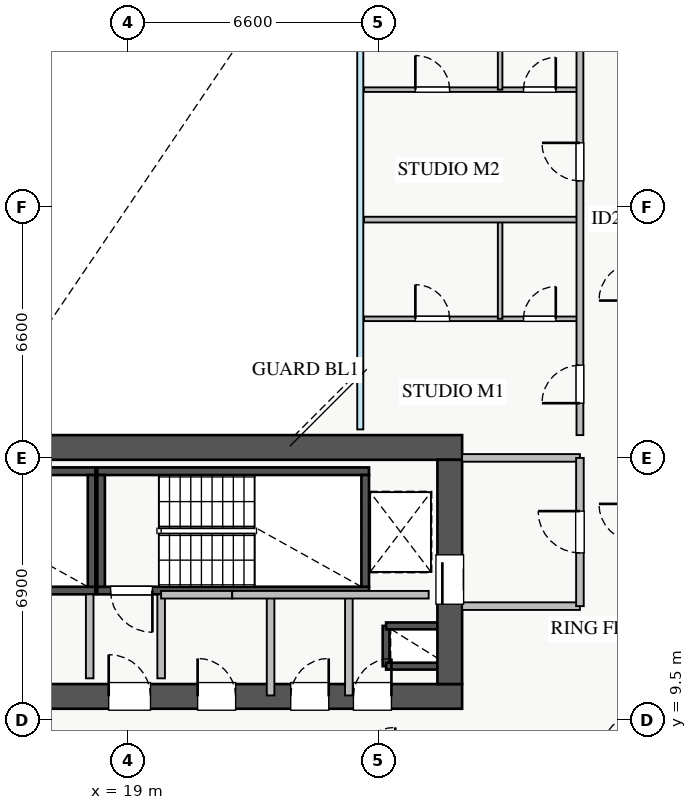
"""IFC4 building model, lengths in metres.
Left out: names, types, materials, properties, quantities, classifications, styles, units other than length and angle.
Written with IfcOpenShell. Run it as: python <this file> out.ifc"""

import sys

from ifc_helpers import new_model, si_unit, direction, frame, frame_2d, origin, place, context, subcontext, project, spatial, rectangle, extrude, source, transform, mapped, element, fill, save


model = new_model("IFC4")
c1 = context("Model", 3, precision=1e-05, world=origin(), true_north=direction((0.0, 1.0)))
c2 = subcontext(c1, "Body", "Model", "MODEL_VIEW")
j1 = project(units=[si_unit("LENGTHUNIT", "METRE"), si_unit("PLANEANGLEUNIT", "RADIAN")], contexts=[c1])
p1 = place(None, origin())
s1 = spatial("IfcSite", under=j1, at=p1, CompositionType="ELEMENT")
p2 = place(p1, origin())
s2 = spatial("IfcBuilding", under=s1, at=p2, CompositionType="ELEMENT")
p3 = place(p2, frame((0.0, 0.0, 100.25)))
s3 = spatial("IfcBuildingStorey", under=s2, at=p3, CompositionType="ELEMENT", Elevation=100.25)
p4 = place(p3, frame((25.8, 10.92, 0.0), z_axis=(0.0, 0.0, 1.0), x_axis=(0.0, 1.0, 0.0)))
e1 = element("IfcWall", 1, at=p4, inside=s3, PredefinedType="SHEAR", context=c2, shape_type="SweptSolid", body=[
    extrude(rectangle(XDim=1.06, YDim=0.18, at=frame_2d((0.53, 0.0))), origin(), (0.0, 0.0, 1.0), 3.07),
])
for number, where, z_axis, x_axis in (
    (2, (25.8, 11.98, 0.0), (0.0, 0.0, 1.0), (1.0, 0.0, 0.0)),
    (3, (25.8, 10.92, 0.0), (0.0, 0.0, 1.0), (1.0, 0.0, 0.0)),
):
    element("IfcWall", number, at=place(p3, frame(where, z_axis=z_axis, x_axis=x_axis)), inside=s3, PredefinedType="SHEAR", context=c2, shape_type="SweptSolid", body=[
        extrude(rectangle(XDim=1.35, YDim=0.18, at=frame_2d((0.675, 0.0))), origin(), (0.0, 0.0, 1.0), 3.07),
    ])
p5 = place(p3, frame((10.85, 12.91, 0.0), z_axis=(0.0, 0.0, 1.0), x_axis=(1.0, 0.0, 0.0)))
e4 = element("IfcWall", 4, at=p5, inside=s3, PredefinedType="SHEAR", context=c2, shape_type="SweptSolid", body=[
    extrude(rectangle(XDim=7.3, YDim=0.2, at=frame_2d((3.65, 0.0))), origin(), (0.0, 0.0, 1.0), 3.25),
])
p6 = place(p5, frame((0.35, 0.0, 0.0)))
e5 = element("IfcOpeningElement", 5, at=p6, cuts=e4, PredefinedType="OPENING", context=c2, shape_type="SweptSolid", body=[
    extrude(rectangle(XDim=1.1, YDim=2.05, at=frame_2d((0.55, 1.025))), frame((0.0, 0.11, 0.0), z_axis=(0.0, -1.0, 0.0), x_axis=(1.0, 0.0, 0.0)), (0.0, 0.0, 1.0), 0.22),
])
p7 = place(p3, frame((10.85, 16.05, 0.0), z_axis=(0.0, 0.0, 1.0), x_axis=(1.0, 0.0, 0.0)))
e6 = element("IfcWall", 6, at=p7, inside=s3, PredefinedType="SHEAR", context=c2, shape_type="SweptSolid", body=[
    extrude(rectangle(XDim=7.3, YDim=0.2, at=frame_2d((3.65, 0.0))), origin(), (0.0, 0.0, 1.0), 3.25),
])
p8 = place(p3, frame((18.05, 13.01, 0.0), z_axis=(0.0, 0.0, 1.0), x_axis=(0.0, 1.0, 0.0)))
e7 = element("IfcWall", 7, at=p8, inside=s3, PredefinedType="SHEAR", context=c2, shape_type="SweptSolid", body=[
    extrude(rectangle(XDim=2.94, YDim=0.2, at=frame_2d((1.47, 0.0))), origin(), (0.0, 0.0, 1.0), 3.25),
])
p9 = place(p3, frame((18.2, 12.91, 0.0), z_axis=(0.0, 0.0, 1.0), x_axis=(1.0, 0.0, 0.0)))
e8 = element("IfcWall", 8, at=p9, inside=s3, PredefinedType="SHEAR", context=c2, shape_type="SweptSolid", body=[
    extrude(rectangle(XDim=7.15, YDim=0.2, at=frame_2d((3.575, 0.0))), origin(), (0.0, 0.0, 1.0), 3.25),
])
p10 = place(p9, frame((0.35, 0.0, 0.0)))
e9 = element("IfcOpeningElement", 9, at=p10, cuts=e8, PredefinedType="OPENING", context=c2, shape_type="SweptSolid", body=[
    extrude(rectangle(XDim=1.1, YDim=2.05, at=frame_2d((0.55, 1.025))), frame((0.0, 0.11, 0.0), z_axis=(0.0, -1.0, 0.0), x_axis=(1.0, 0.0, 0.0)), (0.0, 0.0, 1.0), 0.22),
])
p11 = place(p3, frame((18.2, 16.05, 0.0), z_axis=(0.0, 0.0, 1.0), x_axis=(1.0, 0.0, 0.0)))
e10 = element("IfcWall", 10, at=p11, inside=s3, PredefinedType="SHEAR", context=c2, shape_type="SweptSolid", body=[
    extrude(rectangle(XDim=7.15, YDim=0.2, at=frame_2d((3.575, 0.0))), origin(), (0.0, 0.0, 1.0), 3.25),
])
for number, where, z_axis, x_axis in (
    (11, (18.3, 13.01, 0.0), (0.0, 0.0, 1.0), (0.0, 1.0, 0.0)),
    (12, (25.25, 13.01, 0.0), (0.0, 0.0, 1.0), (0.0, 1.0, 0.0)),
):
    element("IfcWall", number, at=place(p3, frame(where, z_axis=z_axis, x_axis=x_axis)), inside=s3, PredefinedType="SHEAR", context=c2, shape_type="SweptSolid", body=[
        extrude(rectangle(XDim=2.94, YDim=0.2, at=frame_2d((1.47, 0.0))), origin(), (0.0, 0.0, 1.0), 3.25),
    ])
p12 = place(p3, frame((10.2, 10.125, 0.0), z_axis=(0.0, 0.0, 1.0), x_axis=(1.0, 0.0, 0.0)))
e13 = element("IfcWall", 13, at=p12, inside=s3, PredefinedType="SHEAR", context=c2, shape_type="SweptSolid", body=[
    extrude(rectangle(XDim=17.6, YDim=0.65, at=frame_2d((8.8, 0.0))), origin(), (0.0, 0.0, 1.0), 3.25),
])
p13 = place(p12, frame((1.15, 0.0, 0.0)))
e14 = element("IfcOpeningElement", 14, at=p13, cuts=e13, PredefinedType="OPENING", context=c2, shape_type="SweptSolid", body=[
    extrude(rectangle(XDim=1.1, YDim=2.05, at=frame_2d((0.55, 1.025))), frame((0.0, 0.335, 0.0), z_axis=(0.0, -1.0, 0.0), x_axis=(1.0, 0.0, 0.0)), (0.0, 0.0, 1.0), 0.67),
])
p14 = place(p12, frame((8.3, 0.0, 0.0)))
e15 = element("IfcOpeningElement", 15, at=p14, cuts=e13, PredefinedType="OPENING", context=c2, shape_type="SweptSolid", body=[
    extrude(rectangle(XDim=1.1, YDim=2.05, at=frame_2d((0.55, 1.025))), frame((0.0, 0.335, 0.0), z_axis=(0.0, -1.0, 0.0), x_axis=(1.0, 0.0, 0.0)), (0.0, 0.0, 1.0), 0.67),
])
p15 = place(p12, frame((4.9, 0.0, 0.0)))
e16 = element("IfcOpeningElement", 16, at=p15, cuts=e13, PredefinedType="OPENING", context=c2, shape_type="SweptSolid", body=[
    extrude(rectangle(XDim=1.1, YDim=2.05, at=frame_2d((0.55, 1.025))), frame((0.0, 0.335, 0.0), z_axis=(0.0, -1.0, 0.0), x_axis=(1.0, 0.0, 0.0)), (0.0, 0.0, 1.0), 0.67),
])
p16 = place(p12, frame((14.74, 0.0, 0.0)))
e17 = element("IfcOpeningElement", 17, at=p16, cuts=e13, PredefinedType="OPENING", context=c2, shape_type="SweptSolid", body=[
    extrude(rectangle(XDim=1.0, YDim=2.05, at=frame_2d((0.5, 1.025))), frame((0.0, 0.335, 0.0), z_axis=(0.0, -1.0, 0.0), x_axis=(1.0, 0.0, 0.0)), (0.0, 0.0, 1.0), 0.67),
])
p17 = place(p12, frame((10.64, 0.0, 0.0)))
e18 = element("IfcOpeningElement", 18, at=p17, cuts=e13, PredefinedType="OPENING", context=c2, shape_type="SweptSolid", body=[
    extrude(rectangle(XDim=1.0, YDim=2.05, at=frame_2d((0.5, 1.025))), frame((0.0, 0.335, 0.0), z_axis=(0.0, -1.0, 0.0), x_axis=(1.0, 0.0, 0.0)), (0.0, 0.0, 1.0), 0.67),
])
p18 = place(p12, frame((13.09, 0.0, 0.0)))
e19 = element("IfcOpeningElement", 19, at=p18, cuts=e13, PredefinedType="OPENING", context=c2, shape_type="SweptSolid", body=[
    extrude(rectangle(XDim=1.0, YDim=2.05, at=frame_2d((0.5, 1.025))), frame((0.0, 0.335, 0.0), z_axis=(0.0, -1.0, 0.0), x_axis=(1.0, 0.0, 0.0)), (0.0, 0.0, 1.0), 0.67),
])
p19 = place(p3, frame((10.2, 16.675, 0.0), z_axis=(0.0, 0.0, 1.0), x_axis=(1.0, 0.0, 0.0)))
e20 = element("IfcWall", 20, at=p19, inside=s3, PredefinedType="SHEAR", context=c2, shape_type="SweptSolid", body=[
    extrude(rectangle(XDim=17.6, YDim=0.65, at=frame_2d((8.8, 0.0))), origin(), (0.0, 0.0, 1.0), 3.25),
])
p20 = place(p3, frame((27.475, 10.45, 0.0), z_axis=(0.0, 0.0, 1.0), x_axis=(0.0, 1.0, 0.0)))
e21 = element("IfcWall", 21, at=p20, inside=s3, PredefinedType="SHEAR", context=c2, shape_type="SweptSolid", body=[
    extrude(rectangle(XDim=5.9, YDim=0.65, at=frame_2d((2.95, 0.0))), origin(), (0.0, 0.0, 1.0), 3.25),
])
p21 = place(p20, frame((2.1, 0.0, 0.0)))
e22 = element("IfcOpeningElement", 22, at=p21, cuts=e21, PredefinedType="OPENING", context=c2, shape_type="SweptSolid", body=[
    extrude(rectangle(XDim=1.3, YDim=2.05, at=frame_2d((0.65, 1.025))), frame((0.0, 0.335, 0.0), z_axis=(0.0, -1.0, 0.0), x_axis=(1.0, 0.0, 0.0)), (0.0, 0.0, 1.0), 0.67),
])
for number, where, z_axis, x_axis in (
    (23, (27.8, 16.4, 0.0), (0.0, 0.0, 1.0), (1.0, 0.0, 0.0)),
    (24, (27.8, 12.5, 0.0), (0.0, 0.0, 1.0), (1.0, 0.0, 0.0)),
):
    element("IfcWall", number, at=place(p3, frame(where, z_axis=z_axis, x_axis=x_axis)), inside=s3, PredefinedType="PARTITIONING", context=c2, shape_type="SweptSolid", body=[
        extrude(rectangle(XDim=3.1, YDim=0.2, at=frame_2d((1.55, 0.0))), origin(), (0.0, 0.0, 1.0), 3.07),
    ])
p22 = place(p3, frame((30.9, 12.5, 0.0), z_axis=(0.0, 0.0, 1.0), x_axis=(0.0, 1.0, 0.0)))
e25 = element("IfcWall", 25, at=p22, inside=s3, PredefinedType="PARTITIONING", context=c2, shape_type="SweptSolid", body=[
    extrude(rectangle(XDim=3.9, YDim=0.2, at=frame_2d((1.95, 0.0))), origin(), (0.0, 0.0, 1.0), 3.07),
])
p23 = place(p22, frame((1.4, 0.0, 0.0)))
e26 = element("IfcOpeningElement", 26, at=p23, cuts=e25, PredefinedType="OPENING", context=c2, shape_type="SweptSolid", body=[
    extrude(rectangle(XDim=1.1, YDim=2.05, at=frame_2d((0.55, 1.025))), frame((0.0, 0.11, 0.0), z_axis=(0.0, -1.0, 0.0), x_axis=(1.0, 0.0, 0.0)), (0.0, 0.0, 1.0), 0.22),
])
for number, where, z_axis, x_axis in (
    (27, (18.0, 10.6, 0.0), (0.0, 0.0, 1.0), (0.0, 1.0, 0.0)),
    (28, (19.88, 10.6, 0.0), (0.0, 0.0, 1.0), (0.0, 1.0, 0.0)),
):
    element("IfcWall", number, at=place(p3, frame(where, z_axis=z_axis, x_axis=x_axis)), inside=s3, PredefinedType="PARTITIONING", context=c2, shape_type="SweptSolid", body=[
        extrude(rectangle(XDim=2.21, YDim=0.2, at=frame_2d((1.105, 0.0))), origin(), (0.0, 0.0, 1.0), 3.07),
    ])
p24 = place(p3, frame((24.82, 10.15, 0.0), z_axis=(0.0, 0.0, 1.0), x_axis=(0.0, 1.0, 0.0)))
e29 = element("IfcWall", 29, at=p24, inside=s3, PredefinedType="PARTITIONING", context=c2, shape_type="SweptSolid", body=[
    extrude(rectangle(XDim=2.65, YDim=0.2, at=frame_2d((1.325, 0.0))), origin(), (0.0, 0.0, 1.0), 3.07),
])
p25 = place(p3, frame((19.88, 12.8, 0.0), z_axis=(0.0, 0.0, 1.0), x_axis=(1.0, 0.0, 0.0)))
e30 = element("IfcWall", 30, at=p25, inside=s3, PredefinedType="PARTITIONING", context=c2, shape_type="SweptSolid", body=[
    extrude(rectangle(XDim=1.87, YDim=0.2, at=frame_2d((0.935, 0.0))), origin(), (0.0, 0.0, 1.0), 3.07),
])
p26 = place(p3, frame((22.76, 10.15, 0.0), z_axis=(0.0, 0.0, 1.0), x_axis=(0.0, 1.0, 0.0)))
e31 = element("IfcWall", 31, at=p26, inside=s3, PredefinedType="PARTITIONING", context=c2, shape_type="SweptSolid", body=[
    extrude(rectangle(XDim=2.65, YDim=0.2, at=frame_2d((1.325, 0.0))), origin(), (0.0, 0.0, 1.0), 3.07),
])
p27 = place(p3, frame((21.75, 12.8, 0.0), z_axis=(0.0, 0.0, 1.0), x_axis=(1.0, 0.0, 0.0)))
e32 = element("IfcWall", 32, at=p27, inside=s3, PredefinedType="PARTITIONING", context=c2, shape_type="SweptSolid", body=[
    extrude(rectangle(XDim=5.17, YDim=0.2, at=frame_2d((2.585, 0.0))), origin(), (0.0, 0.0, 1.0), 3.07),
])
p28 = place(p3, frame((25.22, 20.06, 0.0), z_axis=(0.0, 0.0, 1.0), x_axis=(1.0, 0.0, 0.0)))
e33 = element("IfcWall", 33, at=p28, inside=s3, PredefinedType="PLUMBINGWALL", context=c2, shape_type="SweptSolid", body=[
    extrude(rectangle(XDim=5.68, YDim=0.12, at=frame_2d((2.84, 0.0))), origin(), (0.0, 0.0, 1.0), 2.625),
])
p29 = place(p28, frame((1.35, 0.0, 0.0)))
e34 = element("IfcOpeningElement", 34, at=p29, cuts=e33, PredefinedType="OPENING", context=c2, shape_type="SweptSolid", body=[
    extrude(rectangle(XDim=0.9, YDim=2.05, at=frame_2d((0.45, 1.025))), frame((0.0, 0.07, 0.0), z_axis=(0.0, -1.0, 0.0), x_axis=(1.0, 0.0, 0.0)), (0.0, 0.0, 1.0), 0.14),
])
p30 = place(p28, frame((4.195, 0.0, 0.0)))
e35 = element("IfcOpeningElement", 35, at=p30, cuts=e33, PredefinedType="OPENING", context=c2, shape_type="SweptSolid", body=[
    extrude(rectangle(XDim=0.85, YDim=2.05, at=frame_2d((0.425, 1.025))), frame((0.0, 0.07, 0.0), z_axis=(0.0, -1.0, 0.0), x_axis=(1.0, 0.0, 0.0)), (0.0, 0.0, 1.0), 0.14),
])
p31 = place(p3, frame((28.8, 20.06, 0.0), z_axis=(0.0, 0.0, 1.0), x_axis=(0.0, 1.0, 0.0)))
e36 = element("IfcWall", 36, at=p31, inside=s3, PredefinedType="PLUMBINGWALL", context=c2, shape_type="SweptSolid", body=[
    extrude(rectangle(XDim=2.61, YDim=0.12, at=frame_2d((1.305, 0.0))), origin(), (0.0, 0.0, 1.0), 3.07),
])
p32 = place(p3, frame((25.22, 26.09, 0.0), z_axis=(0.0, 0.0, 1.0), x_axis=(1.0, 0.0, 0.0)))
e37 = element("IfcWall", 37, at=p32, inside=s3, PredefinedType="PLUMBINGWALL", context=c2, shape_type="SweptSolid", body=[
    extrude(rectangle(XDim=5.68, YDim=0.12, at=frame_2d((2.84, 0.0))), origin(), (0.0, 0.0, 1.0), 2.625),
])
p33 = place(p32, frame((1.35, 0.0, 0.0)))
e38 = element("IfcOpeningElement", 38, at=p33, cuts=e37, PredefinedType="OPENING", context=c2, shape_type="SweptSolid", body=[
    extrude(rectangle(XDim=0.9, YDim=2.05, at=frame_2d((0.45, 1.025))), frame((0.0, 0.07, 0.0), z_axis=(0.0, -1.0, 0.0), x_axis=(1.0, 0.0, 0.0)), (0.0, 0.0, 1.0), 0.14),
])
p34 = place(p32, frame((4.195, 0.0, 0.0)))
e39 = element("IfcOpeningElement", 39, at=p34, cuts=e37, PredefinedType="OPENING", context=c2, shape_type="SweptSolid", body=[
    extrude(rectangle(XDim=0.85, YDim=2.05, at=frame_2d((0.425, 1.025))), frame((0.0, 0.07, 0.0), z_axis=(0.0, -1.0, 0.0), x_axis=(1.0, 0.0, 0.0)), (0.0, 0.0, 1.0), 0.14),
])
p35 = place(p3, frame((28.8, 26.09, 0.0), z_axis=(0.0, 0.0, 1.0), x_axis=(0.0, 1.0, 0.0)))
e40 = element("IfcWall", 40, at=p35, inside=s3, PredefinedType="PLUMBINGWALL", context=c2, shape_type="SweptSolid", body=[
    extrude(rectangle(XDim=2.91, YDim=0.12, at=frame_2d((1.455, 0.0))), origin(), (0.0, 0.0, 1.0), 3.07),
])
p36 = place(p3, frame((25.22, 22.67, 0.0), z_axis=(0.0, 0.0, 1.0), x_axis=(1.0, 0.0, 0.0)))
e41 = element("IfcWall", 41, at=p36, inside=s3, PredefinedType="PARTITIONING", context=c2, shape_type="SweptSolid", body=[
    extrude(rectangle(XDim=5.68, YDim=0.15, at=frame_2d((2.84, 0.0))), origin(), (0.0, 0.0, 1.0), 3.07),
])
p37 = place(p3, frame((30.9, 17.0, 0.0), z_axis=(0.0, 0.0, 1.0), x_axis=(0.0, 1.0, 0.0)))
e42 = element("IfcWall", 42, at=p37, inside=s3, PredefinedType="PARTITIONING", context=c2, shape_type="SweptSolid", body=[
    extrude(rectangle(XDim=12.0, YDim=0.18, at=frame_2d((6.0, 0.0))), origin(), (0.0, 0.0, 1.0), 3.07),
])
p38 = place(p37, frame((0.84, 0.0, 0.0)))
e43 = element("IfcOpeningElement", 43, at=p38, cuts=e42, PredefinedType="OPENING", context=c2, shape_type="SweptSolid", body=[
    extrude(rectangle(XDim=1.0, YDim=2.05, at=frame_2d((0.5, 1.025))), frame((0.0, 0.1, 0.0), z_axis=(0.0, -1.0, 0.0), x_axis=(1.0, 0.0, 0.0)), (0.0, 0.0, 1.0), 0.2),
])
p39 = place(p37, frame((6.69, 0.0, 0.0)))
e44 = element("IfcOpeningElement", 44, at=p39, cuts=e42, PredefinedType="OPENING", context=c2, shape_type="SweptSolid", body=[
    extrude(rectangle(XDim=1.0, YDim=2.05, at=frame_2d((0.5, 1.025))), frame((0.0, 0.1, 0.0), z_axis=(0.0, -1.0, 0.0), x_axis=(1.0, 0.0, 0.0)), (0.0, 0.0, 1.0), 0.2),
])
m1 = source(origin(), c2, "Body", "SweptSolid", [
    extrude(rectangle(XDim=1.3, YDim=2.05, at=frame_2d((0.65, 1.025))), frame((0.0, 0.025, 0.0), z_axis=(0.0, -1.0, 0.0), x_axis=(1.0, 0.0, 0.0)), (0.0, 0.0, 1.0), 0.05),
])
p40 = place(p21, origin())
e45 = element("IfcDoor", 45, at=p40, inside=s3, OperationType="SLIDING_TO_RIGHT", PredefinedType="DOOR", context=c2, shape_type="MappedRepresentation", body=[
    mapped(m1, transform((0.0, 0.0, 0.0), x_axis=(1.0, 0.0, 0.0), y_axis=(0.0, 1.0, 0.0), z_axis=(0.0, 0.0, 1.0), scale=1.0)),
])
fill(e22, e45)
m2 = source(origin(), c2, "Body", "SweptSolid", [
    extrude(rectangle(XDim=1.1, YDim=2.05, at=frame_2d((0.55, 1.025))), frame((0.0, 0.025, 0.0), z_axis=(0.0, -1.0, 0.0), x_axis=(1.0, 0.0, 0.0)), (0.0, 0.0, 1.0), 0.05),
])
p41 = place(p14, origin())
e46 = element("IfcDoor", 46, at=p41, inside=s3, OperationType="SINGLE_SWING_LEFT", PredefinedType="DOOR", context=c2, shape_type="MappedRepresentation", body=[
    mapped(m2, transform((0.0, 0.0, 0.0), x_axis=(1.0, 0.0, 0.0), y_axis=(0.0, 1.0, 0.0), z_axis=(0.0, 0.0, 1.0), scale=1.0)),
])
fill(e15, e46)
p42 = place(p10, frame((1.1, 0.0, 0.0), z_axis=(0.0, 0.0, 1.0), x_axis=(-1.0, 0.0, 0.0)))
e47 = element("IfcDoor", 47, at=p42, inside=s3, OperationType="SINGLE_SWING_RIGHT", PredefinedType="DOOR", context=c2, shape_type="MappedRepresentation", body=[
    mapped(m2, transform((0.0, 0.0, 0.0), x_axis=(1.0, 0.0, 0.0), y_axis=(0.0, 1.0, 0.0), z_axis=(0.0, 0.0, 1.0), scale=1.0)),
])
fill(e9, e47)
m3 = source(origin(), c2, "Body", "SweptSolid", [
    extrude(rectangle(XDim=1.0, YDim=2.05, at=frame_2d((0.5, 1.025))), frame((0.0, 0.025, 0.0), z_axis=(0.0, -1.0, 0.0), x_axis=(1.0, 0.0, 0.0)), (0.0, 0.0, 1.0), 0.05),
])
p43 = place(p16, origin())
e48 = element("IfcDoor", 48, at=p43, inside=s3, OperationType="SINGLE_SWING_RIGHT", PredefinedType="DOOR", context=c2, shape_type="MappedRepresentation", body=[
    mapped(m3, transform((0.0, 0.0, 0.0), x_axis=(1.0, 0.0, 0.0), y_axis=(0.0, 1.0, 0.0), z_axis=(0.0, 0.0, 1.0), scale=1.0)),
])
fill(e17, e48)
p44 = place(p17, origin())
e49 = element("IfcDoor", 49, at=p44, inside=s3, OperationType="SINGLE_SWING_LEFT", PredefinedType="DOOR", context=c2, shape_type="MappedRepresentation", body=[
    mapped(m3, transform((0.0, 0.0, 0.0), x_axis=(1.0, 0.0, 0.0), y_axis=(0.0, 1.0, 0.0), z_axis=(0.0, 0.0, 1.0), scale=1.0)),
])
fill(e18, e49)
p45 = place(p18, origin())
e50 = element("IfcDoor", 50, at=p45, inside=s3, OperationType="SINGLE_SWING_RIGHT", PredefinedType="DOOR", context=c2, shape_type="MappedRepresentation", body=[
    mapped(m3, transform((0.0, 0.0, 0.0), x_axis=(1.0, 0.0, 0.0), y_axis=(0.0, 1.0, 0.0), z_axis=(0.0, 0.0, 1.0), scale=1.0)),
])
fill(e19, e50)
p46 = place(p23, origin())
e51 = element("IfcDoor", 51, at=p46, inside=s3, OperationType="SINGLE_SWING_RIGHT", PredefinedType="DOOR", context=c2, shape_type="MappedRepresentation", body=[
    mapped(m2, transform((0.0, 0.0, 0.0), x_axis=(1.0, 0.0, 0.0), y_axis=(0.0, 1.0, 0.0), z_axis=(0.0, 0.0, 1.0), scale=1.0)),
])
fill(e26, e51)
m4 = source(origin(), c2, "Body", "SweptSolid", [
    extrude(rectangle(XDim=0.9, YDim=2.05, at=frame_2d((0.45, 1.025))), frame((0.0, 0.025, 0.0), z_axis=(0.0, -1.0, 0.0), x_axis=(1.0, 0.0, 0.0)), (0.0, 0.0, 1.0), 0.05),
])
p47 = place(p29, origin())
e52 = element("IfcDoor", 52, at=p47, inside=s3, OperationType="SINGLE_SWING_LEFT", PredefinedType="DOOR", context=c2, shape_type="MappedRepresentation", body=[
    mapped(m4, transform((0.0, 0.0, 0.0), x_axis=(1.0, 0.0, 0.0), y_axis=(0.0, 1.0, 0.0), z_axis=(0.0, 0.0, 1.0), scale=1.0)),
])
fill(e34, e52)
m5 = source(origin(), c2, "Body", "SweptSolid", [
    extrude(rectangle(XDim=0.85, YDim=2.05, at=frame_2d((0.425, 1.025))), frame((0.0, 0.025, 0.0), z_axis=(0.0, -1.0, 0.0), x_axis=(1.0, 0.0, 0.0)), (0.0, 0.0, 1.0), 0.05),
])
p48 = place(p30, origin())
e53 = element("IfcDoor", 53, at=p48, inside=s3, OperationType="SINGLE_SWING_RIGHT", PredefinedType="DOOR", context=c2, shape_type="MappedRepresentation", body=[
    mapped(m5, transform((0.0, 0.0, 0.0), x_axis=(1.0, 0.0, 0.0), y_axis=(0.0, 1.0, 0.0), z_axis=(0.0, 0.0, 1.0), scale=1.0)),
])
fill(e35, e53)
p49 = place(p33, origin())
e54 = element("IfcDoor", 54, at=p49, inside=s3, OperationType="SINGLE_SWING_LEFT", PredefinedType="DOOR", context=c2, shape_type="MappedRepresentation", body=[
    mapped(m4, transform((0.0, 0.0, 0.0), x_axis=(1.0, 0.0, 0.0), y_axis=(0.0, 1.0, 0.0), z_axis=(0.0, 0.0, 1.0), scale=1.0)),
])
fill(e38, e54)
p50 = place(p34, origin())
e55 = element("IfcDoor", 55, at=p50, inside=s3, OperationType="SINGLE_SWING_RIGHT", PredefinedType="DOOR", context=c2, shape_type="MappedRepresentation", body=[
    mapped(m5, transform((0.0, 0.0, 0.0), x_axis=(1.0, 0.0, 0.0), y_axis=(0.0, 1.0, 0.0), z_axis=(0.0, 0.0, 1.0), scale=1.0)),
])
fill(e39, e55)
p51 = place(p38, origin())
e56 = element("IfcDoor", 56, at=p51, inside=s3, OperationType="SINGLE_SWING_LEFT", PredefinedType="DOOR", context=c2, shape_type="MappedRepresentation", body=[
    mapped(m3, transform((0.0, 0.0, 0.0), x_axis=(1.0, 0.0, 0.0), y_axis=(0.0, 1.0, 0.0), z_axis=(0.0, 0.0, 1.0), scale=1.0)),
])
fill(e43, e56)
p52 = place(p39, origin())
e57 = element("IfcDoor", 57, at=p52, inside=s3, OperationType="SINGLE_SWING_RIGHT", PredefinedType="DOOR", context=c2, shape_type="MappedRepresentation", body=[
    mapped(m3, transform((0.0, 0.0, 0.0), x_axis=(1.0, 0.0, 0.0), y_axis=(0.0, 1.0, 0.0), z_axis=(0.0, 0.0, 1.0), scale=1.0)),
])
fill(e44, e57)
save(model, sys.argv[1])
